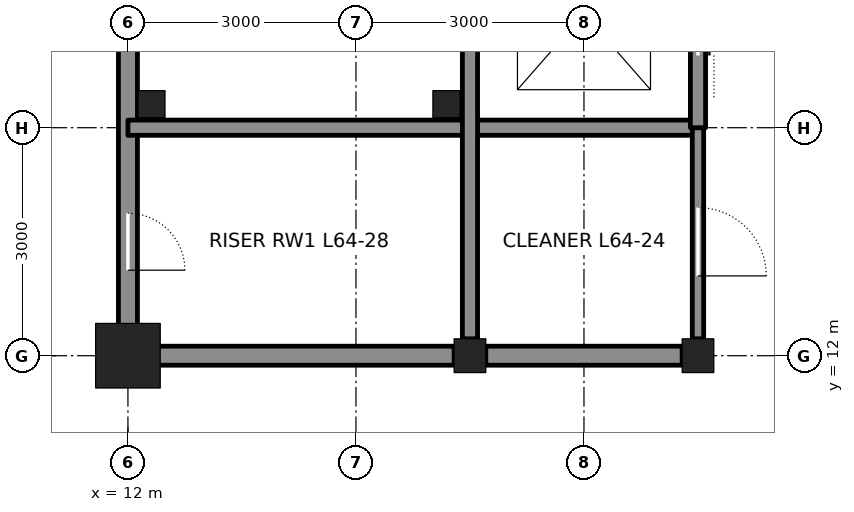
"""IFC4 building model, lengths in metres.
Left out: names, types, materials, properties, quantities, classifications, styles, units other than length and angle.
Written with IfcOpenShell. Run it as: python <this file> out.ifc"""

import sys

from ifc_helpers import new_model, si_unit, direction, frame, frame_2d, origin, origin_2d, place, context, subcontext, project, spatial, rectangle, hollow_rectangle, i_section, extrude, element, fill, save


model = new_model("IFC4")
c1 = context("Model", 3, precision=1e-05, world=origin(), true_north=direction((0.0, 1.0)))
c2 = subcontext(c1, "Body", "Model", "MODEL_VIEW")
j1 = project(units=[si_unit("LENGTHUNIT", "METRE"), si_unit("PLANEANGLEUNIT", "RADIAN")], contexts=[c1])
p1 = place(None, origin())
s1 = spatial("IfcSite", under=j1, at=p1, CompositionType="ELEMENT")
p2 = place(p1, origin())
s2 = spatial("IfcBuilding", under=s1, at=p2, CompositionType="ELEMENT")
p3 = place(p2, frame((0.0, 0.0, 287.4)))
s3 = spatial("IfcBuildingStorey", under=s2, at=p3, CompositionType="ELEMENT", Elevation=287.4)
p4 = place(p3, frame((12.0, 12.0, 0.0), z_axis=(0.0, 0.0, 1.0), x_axis=(1.0, 0.0, 0.0)))
e1 = element("IfcColumn", 1, at=p4, inside=s3, PredefinedType="COLUMN", context=c2, shape_type="SweptSolid", body=[
    extrude(hollow_rectangle(XDim=0.85, YDim=0.85, WallThickness=0.085, at=origin_2d()), origin(), (0.0, 0.0, 1.0), 4.2),
])
for number, where, z_axis, x_axis in (
    (2, (16.5, 12.0, 0.0), (0.0, 0.0, 1.0), (1.0, 0.0, 0.0)),
    (3, (19.5, 12.0, 0.0), (0.0, 0.0, 1.0), (1.0, 0.0, 0.0)),
):
    element("IfcColumn", number, at=place(p3, frame(where, z_axis=z_axis, x_axis=x_axis)), inside=s3, PredefinedType="COLUMN", context=c2, shape_type="SweptSolid", body=[
        extrude(i_section(OverallWidth=0.417, OverallDepth=0.445, WebThickness=0.039, FlangeThickness=0.063, at=origin_2d()), origin(), (0.0, 0.0, 1.0), 4.2),
    ])
p5 = place(p3, frame((12.0, 12.25, 0.0), z_axis=(0.0, 0.0, 1.0), x_axis=(0.0, 1.0, 0.0)))
e4 = element("IfcWall", 4, at=p5, inside=s3, PredefinedType="SOLIDWALL", context=c2, shape_type="SweptSolid", body=[
    extrude(rectangle(XDim=8.528, YDim=0.25, at=frame_2d((4.264, 0.0))), origin(), (0.0, 0.0, 1.0), 3.113),
])
p6 = place(p5, frame((0.875, 0.0, 0.0)))
e5 = element("IfcOpeningElement", 5, at=p6, cuts=e4, PredefinedType="OPENING", context=c2, shape_type="SweptSolid", body=[
    extrude(rectangle(XDim=0.75, YDim=2.1, at=frame_2d((0.375, 1.05))), frame((0.0, 0.135, 0.0), z_axis=(0.0, -1.0, 0.0), x_axis=(1.0, 0.0, 0.0)), (0.0, 0.0, 1.0), 0.27),
])
p7 = place(p3, frame((12.25, 12.0, 0.0), z_axis=(0.0, 0.0, 1.0), x_axis=(1.0, 0.0, 0.0)))
e6 = element("IfcWall", 6, at=p7, inside=s3, PredefinedType="SOLIDWALL", context=c2, shape_type="SweptSolid", body=[
    extrude(rectangle(XDim=4.042, YDim=0.25, at=frame_2d((2.021, 0.0))), origin(), (0.0, 0.0, 1.0), 3.182),
])
p8 = place(p3, frame((16.708, 12.0, 0.0), z_axis=(0.0, 0.0, 1.0), x_axis=(1.0, 0.0, 0.0)))
e7 = element("IfcWall", 7, at=p8, inside=s3, PredefinedType="SOLIDWALL", context=c2, shape_type="SweptSolid", body=[
    extrude(rectangle(XDim=2.583, YDim=0.25, at=frame_2d((1.292, 0.0))), origin(), (0.0, 0.0, 1.0), 3.182),
])
p9 = place(p3, frame((12.0, 15.0, 0.0), z_axis=(0.0, 0.0, 1.0), x_axis=(1.0, 0.0, 0.0)))
e8 = element("IfcWall", 8, at=p9, inside=s3, PredefinedType="SOLIDWALL", context=c2, shape_type="SweptSolid", body=[
    extrude(rectangle(XDim=7.5, YDim=0.2, at=frame_2d((3.75, 0.0))), origin(), (0.0, 0.0, 1.0), 4.04),
])
p10 = place(p3, frame((16.5, 12.222, 0.0), z_axis=(0.0, 0.0, 1.0), x_axis=(0.0, 1.0, 0.0)))
e9 = element("IfcWall", 9, at=p10, inside=s3, PredefinedType="SOLIDWALL", context=c2, shape_type="SweptSolid", body=[
    extrude(rectangle(XDim=8.555, YDim=0.2, at=frame_2d((4.278, 0.0))), origin(), (0.0, 0.0, 1.0), 3.113),
])
p11 = place(p3, frame((19.5, 12.222, 0.0), z_axis=(0.0, 0.0, 1.0), x_axis=(0.0, 1.0, 0.0)))
e10 = element("IfcWall", 10, at=p11, inside=s3, PredefinedType="PARTITIONING", context=c2, shape_type="SweptSolid", body=[
    extrude(rectangle(XDim=2.778, YDim=0.15, at=frame_2d((1.389, 0.0))), origin(), (0.0, 0.0, 1.0), 3.065),
])
p12 = place(p11, frame((0.828, 0.0, 0.0)))
e11 = element("IfcOpeningElement", 11, at=p12, cuts=e10, PredefinedType="OPENING", context=c2, shape_type="SweptSolid", body=[
    extrude(rectangle(XDim=0.9, YDim=2.1, at=frame_2d((0.45, 1.05))), frame((0.0, 0.085, 0.0), z_axis=(0.0, -1.0, 0.0), x_axis=(1.0, 0.0, 0.0)), (0.0, 0.0, 1.0), 0.17),
])
p13 = place(p3, frame((19.5, 15.0, 0.0), z_axis=(0.0, 0.0, 1.0), x_axis=(0.0, 1.0, 0.0)))
e12 = element("IfcWall", 12, at=p13, inside=s3, PredefinedType="SOLIDWALL", context=c2, shape_type="SweptSolid", body=[
    extrude(rectangle(XDim=12.0, YDim=0.2, at=frame_2d((6.0, 0.0))), origin(), (0.0, 0.0, 1.0), 3.065),
])
p14 = place(p13, frame((0.95, 0.0, 0.0)))
e13 = element("IfcOpeningElement", 13, at=p14, cuts=e12, PredefinedType="OPENING", context=c2, shape_type="SweptSolid", body=[
    extrude(rectangle(XDim=1.1, YDim=2.1, at=frame_2d((0.55, 1.05))), frame((0.0, 0.11, 0.0), z_axis=(0.0, -1.0, 0.0), x_axis=(1.0, 0.0, 0.0)), (0.0, 0.0, 1.0), 0.22),
])
p15 = place(p13, frame((3.95, 0.0, 0.0)))
e14 = element("IfcOpeningElement", 14, at=p15, cuts=e12, PredefinedType="OPENING", context=c2, shape_type="SweptSolid", body=[
    extrude(rectangle(XDim=1.1, YDim=2.1, at=frame_2d((0.55, 1.05))), frame((0.0, 0.11, 0.0), z_axis=(0.0, -1.0, 0.0), x_axis=(1.0, 0.0, 0.0)), (0.0, 0.0, 1.0), 0.22),
])
p16 = place(p13, frame((6.95, 0.0, 0.0)))
e15 = element("IfcOpeningElement", 15, at=p16, cuts=e12, PredefinedType="OPENING", context=c2, shape_type="SweptSolid", body=[
    extrude(rectangle(XDim=1.1, YDim=2.1, at=frame_2d((0.55, 1.05))), frame((0.0, 0.11, 0.0), z_axis=(0.0, -1.0, 0.0), x_axis=(1.0, 0.0, 0.0)), (0.0, 0.0, 1.0), 0.22),
])
p17 = place(p13, frame((9.95, 0.0, 0.0)))
e16 = element("IfcOpeningElement", 16, at=p17, cuts=e12, PredefinedType="OPENING", context=c2, shape_type="SweptSolid", body=[
    extrude(rectangle(XDim=1.1, YDim=2.1, at=frame_2d((0.55, 1.05))), frame((0.0, 0.11, 0.0), z_axis=(0.0, -1.0, 0.0), x_axis=(1.0, 0.0, 0.0)), (0.0, 0.0, 1.0), 0.22),
])
for number, where, z_axis, x_axis in (
    (17, (12.31, 15.31, 0.0), (0.0, 0.0, 1.0), (1.0, 0.0, 0.0)),
    (18, (16.19, 15.31, 0.0), (0.0, 0.0, 1.0), (1.0, 0.0, 0.0)),
):
    element("IfcColumn", number, at=place(p3, frame(where, z_axis=z_axis, x_axis=x_axis)), inside=s3, PredefinedType="COLUMN", context=c2, shape_type="SweptSolid", body=[
        extrude(hollow_rectangle(XDim=0.356, YDim=0.356, WallThickness=0.009, at=origin_2d()), origin(), (0.0, 0.0, 1.0), 4.2),
    ])
p18 = place(p6, frame((0.75, 0.0, 0.0), z_axis=(0.0, 0.0, 1.0), x_axis=(-1.0, 0.0, 0.0)))
e19 = element("IfcDoor", 19, at=p18, inside=s3, OperationType="SINGLE_SWING_RIGHT", PredefinedType="DOOR", context=c2, shape_type="SweptSolid", body=[
    extrude(rectangle(XDim=0.75, YDim=2.1, at=frame_2d((0.375, 1.05))), frame((0.0, 0.025, 0.0), z_axis=(0.0, -1.0, 0.0), x_axis=(1.0, 0.0, 0.0)), (0.0, 0.0, 1.0), 0.05),
])
fill(e5, e19)
p19 = place(p12, frame((0.9, 0.0, 0.0), z_axis=(0.0, 0.0, 1.0), x_axis=(-1.0, 0.0, 0.0)))
e20 = element("IfcDoor", 20, at=p19, inside=s3, OperationType="SINGLE_SWING_RIGHT", PredefinedType="DOOR", context=c2, shape_type="SweptSolid", body=[
    extrude(rectangle(XDim=0.9, YDim=2.1, at=frame_2d((0.45, 1.05))), frame((0.0, 0.025, 0.0), z_axis=(0.0, -1.0, 0.0), x_axis=(1.0, 0.0, 0.0)), (0.0, 0.0, 1.0), 0.05),
])
fill(e11, e20)
p20 = place(p14, origin())
e21 = element("IfcDoor", 21, at=p20, inside=s3, OperationType="DOUBLE_DOOR_SLIDING", PredefinedType="DOOR", context=c2, shape_type="SweptSolid", body=[
    extrude(rectangle(XDim=1.1, YDim=2.1, at=frame_2d((0.55, 1.05))), frame((0.0, 0.025, 0.0), z_axis=(0.0, -1.0, 0.0), x_axis=(1.0, 0.0, 0.0)), (0.0, 0.0, 1.0), 0.05),
])
fill(e13, e21)
save(model, sys.argv[1])
